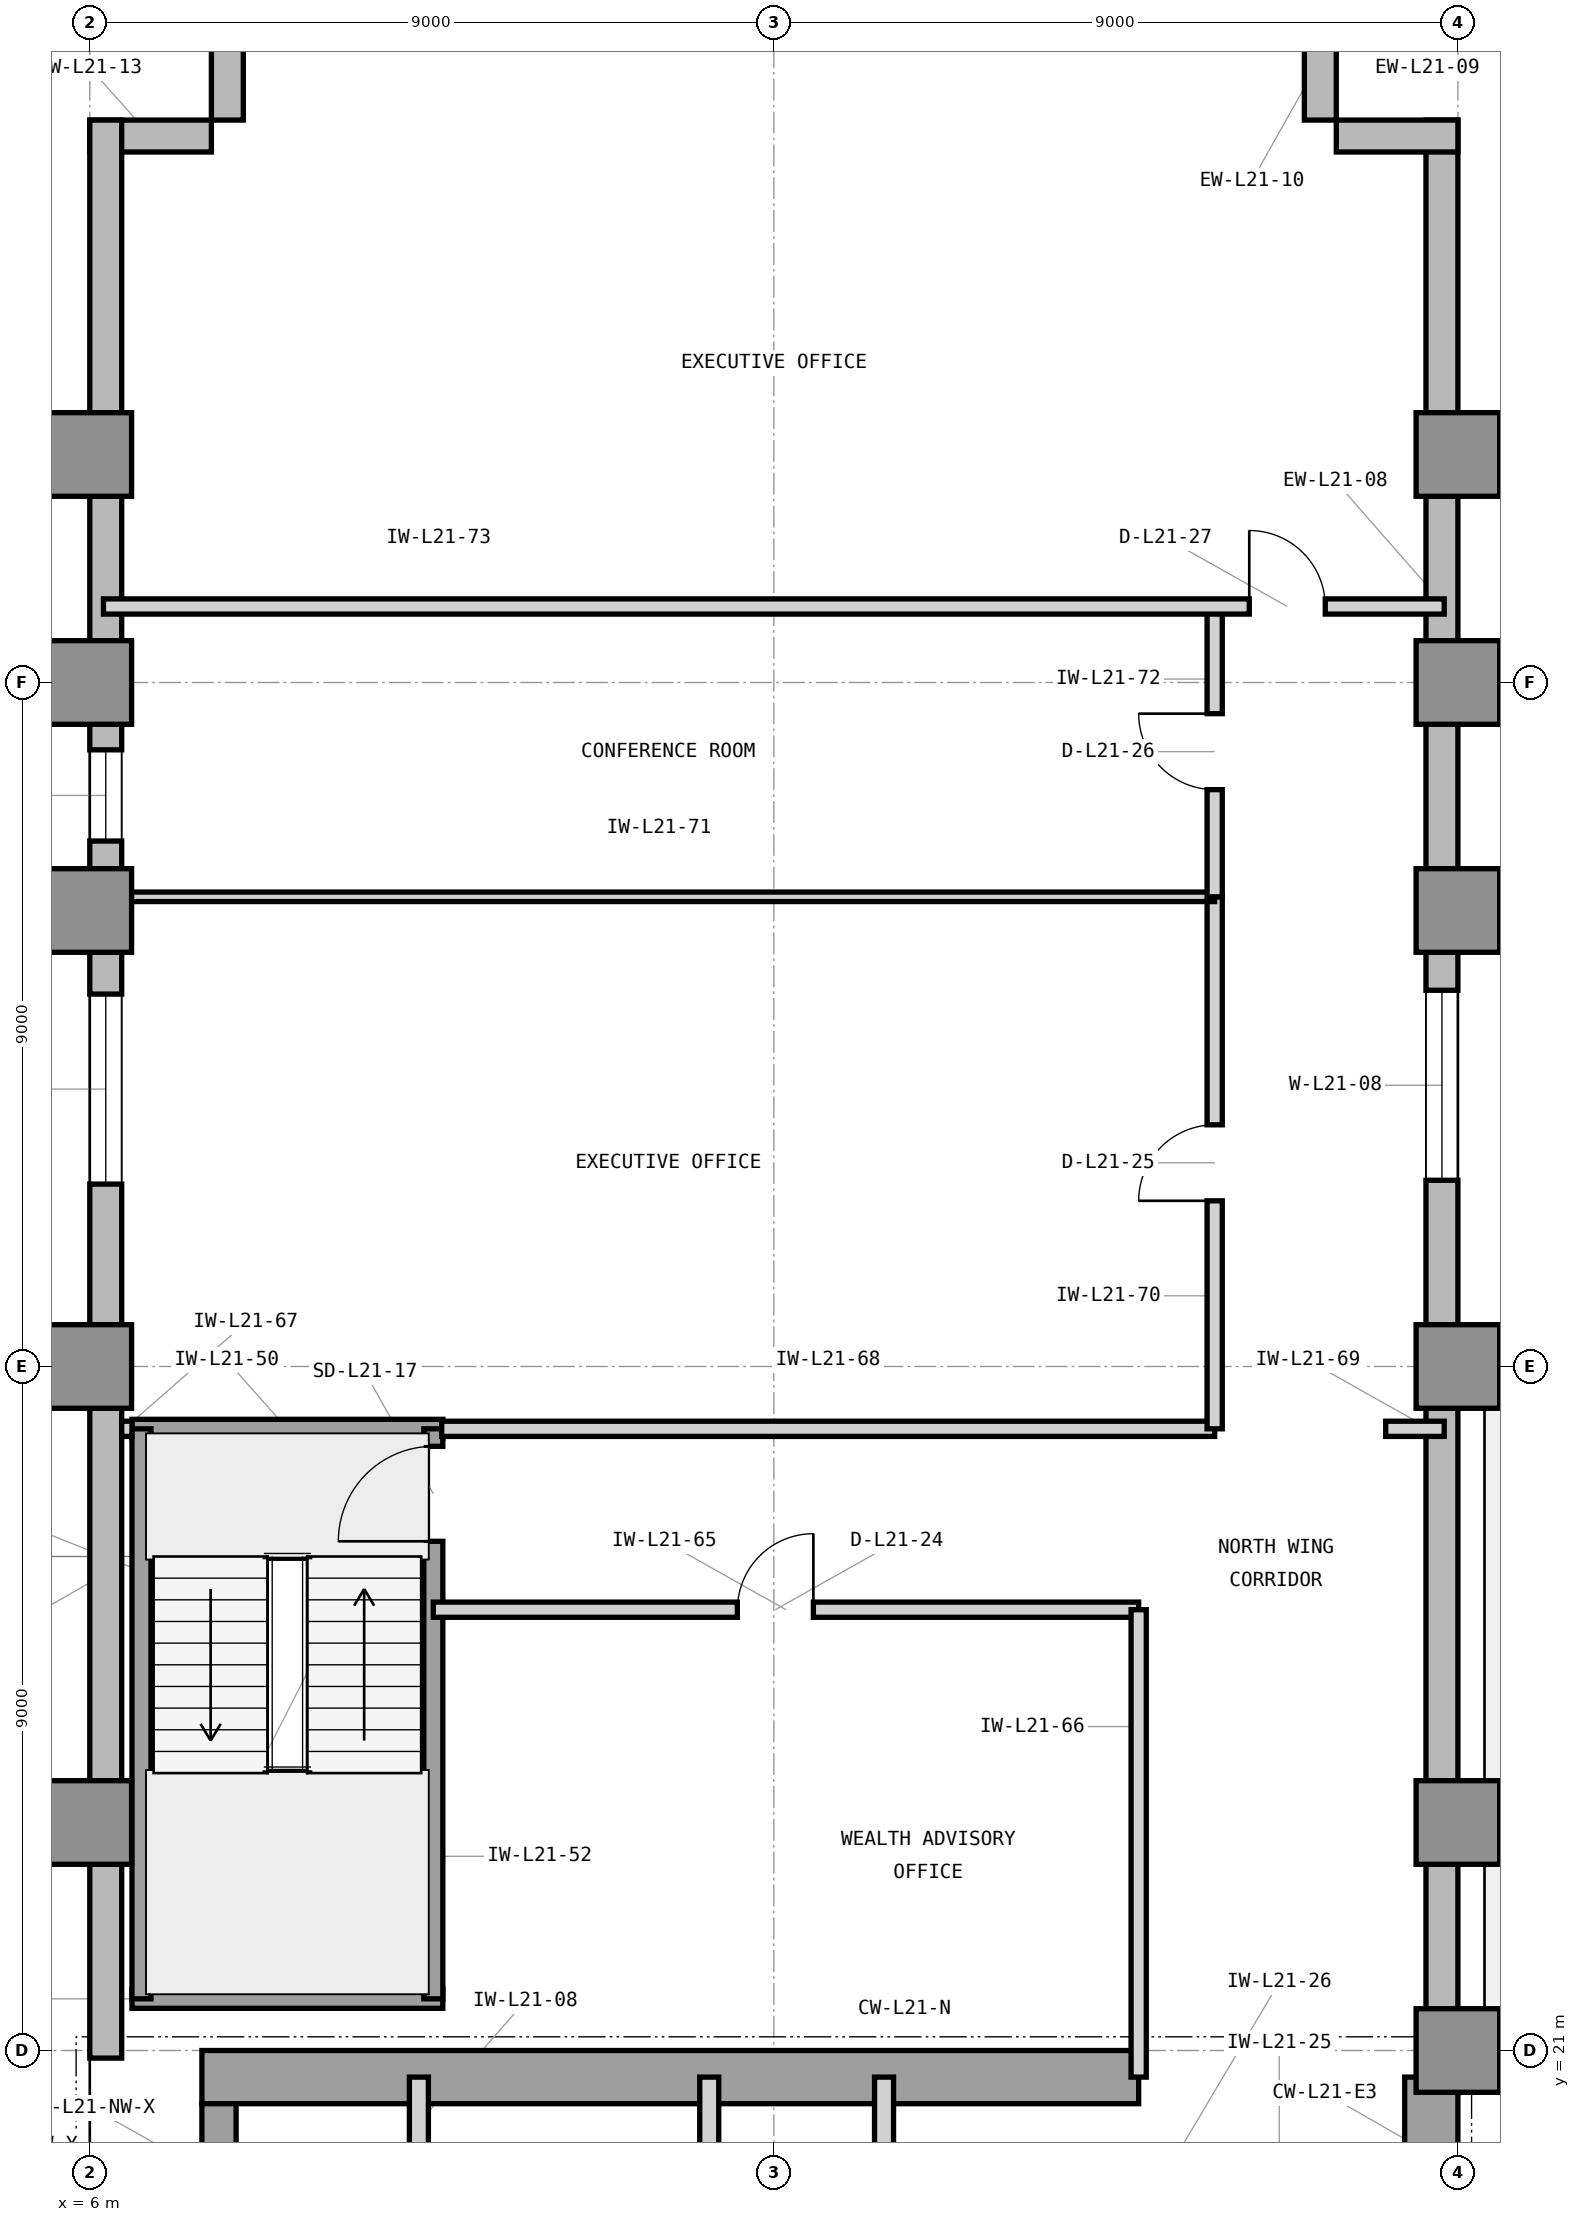
"""IFC4 building model, lengths in metres.
Left out: names, types, materials, properties, quantities, classifications, styles, units other than length and angle.
Written with IfcOpenShell. Run it as: python <this file> out.ifc"""

import sys

from ifc_helpers import new_model, si_unit, direction, frame, frame_2d, origin, origin_2d, place, context, subcontext, project, spatial, rectangle, extrude, element, fill, save


model = new_model("IFC4")
c1 = context("Model", 3, precision=1e-05, world=origin(), true_north=direction((0.0, 1.0)))
c2 = subcontext(c1, "Body", "Model", "MODEL_VIEW")
j1 = project(units=[si_unit("LENGTHUNIT", "METRE"), si_unit("PLANEANGLEUNIT", "RADIAN")], contexts=[c1])
p1 = place(None, origin())
s1 = spatial("IfcSite", under=j1, at=p1, CompositionType="ELEMENT")
p2 = place(p1, origin())
s2 = spatial("IfcBuilding", under=s1, at=p2, CompositionType="ELEMENT")
p3 = place(p2, frame((0.0, 0.0, 93.3)))
s3 = spatial("IfcBuildingStorey", under=s2, at=p3, CompositionType="ELEMENT", Elevation=93.3)
p4 = place(p3, frame((7.475, 20.65, 0.0), z_axis=(0.0, 0.0, 1.0), x_axis=(1.0, 0.0, 0.0)))
e1 = element("IfcWall", 1, at=p4, inside=s3, PredefinedType="SHEAR", context=c2, shape_type="SweptSolid", body=[
    extrude(rectangle(XDim=12.325, YDim=0.7, at=frame_2d((6.163, 0.0))), origin(), (0.0, 0.0, 1.0), 3.9),
])
p5 = place(p3, frame((23.65, 16.6, 0.0), z_axis=(0.0, 0.0, 1.0), x_axis=(0.0, 1.0, 0.0)))
e2 = element("IfcWall", 2, at=p5, inside=s3, PredefinedType="SHEAR", context=c2, shape_type="SweptSolid", body=[
    extrude(rectangle(XDim=4.05, YDim=0.7, at=frame_2d((2.025, 0.0))), origin(), (0.0, 0.0, 1.0), 3.9),
])
p6 = place(p3, frame((7.7, 19.575, 0.0), z_axis=(0.0, 0.0, 1.0), x_axis=(0.0, 1.0, 0.0)))
e3 = element("IfcWall", 3, at=p6, inside=s3, PredefinedType="SHEAR", context=c2, shape_type="SweptSolid", body=[
    extrude(rectangle(XDim=0.725, YDim=0.45, at=frame_2d((0.363, 0.0))), origin(), (0.0, 0.0, 1.0), 3.9),
])
for number, where, z_axis, x_axis in (
    (4, (24.0, 21.0, 0.0), (0.0, 0.0, 1.0), (1.0, 0.0, 0.0)),
    (5, (6.0, 24.0, 0.0), (0.0, 0.0, 1.0), (1.0, 0.0, 0.0)),
    (6, (24.0, 24.0, 0.0), (0.0, 0.0, 1.0), (1.0, 0.0, 0.0)),
    (7, (6.0, 30.0, 0.0), (0.0, 0.0, 1.0), (1.0, 0.0, 0.0)),
    (8, (24.0, 30.0, 0.0), (0.0, 0.0, 1.0), (1.0, 0.0, 0.0)),
    (9, (6.0, 36.0, 0.0), (0.0, 0.0, 1.0), (1.0, 0.0, 0.0)),
    (10, (24.0, 36.0, 0.0), (0.0, 0.0, 1.0), (1.0, 0.0, 0.0)),
    (11, (6.0, 39.0, 0.0), (0.0, 0.0, 1.0), (1.0, 0.0, 0.0)),
    (12, (24.0, 39.0, 0.0), (0.0, 0.0, 1.0), (1.0, 0.0, 0.0)),
    (13, (6.0, 42.0, 0.0), (0.0, 0.0, 1.0), (1.0, 0.0, 0.0)),
    (14, (24.0, 42.0, 0.0), (0.0, 0.0, 1.0), (1.0, 0.0, 0.0)),
):
    element("IfcColumn", number, at=place(p3, frame(where, z_axis=z_axis, x_axis=x_axis)), inside=s3, PredefinedType="COLUMN", context=c2, shape_type="SweptSolid", body=[
        extrude(rectangle(XDim=1.1, YDim=1.1, at=origin_2d()), origin(), (0.0, 0.0, 1.0), 3.9),
    ])
p7 = place(p3, frame((61.4, 20.79, 0.0), z_axis=(0.0, 0.0, 1.0), x_axis=(-1.0, 0.0, 0.0)))
e15 = element("IfcWall", 15, at=p7, inside=s3, PredefinedType="STANDARD", context=c2, shape_type="SweptSolid", body=[
    extrude(rectangle(XDim=37.4, YDim=0.42, at=frame_2d((18.7, 0.0))), origin(), (0.0, 0.0, 1.0), 3.7),
])
p8 = place(p7, frame((15.113, 0.0, 0.85)))
e16 = element("IfcOpeningElement", 16, at=p8, cuts=e15, PredefinedType="OPENING", context=c2, shape_type="SweptSolid", body=[
    extrude(rectangle(XDim=2.5, YDim=2.25, at=frame_2d((1.25, 1.125))), frame((0.0, 0.22, 0.0), z_axis=(0.0, -1.0, 0.0), x_axis=(1.0, 0.0, 0.0)), (0.0, 0.0, 1.0), 0.44),
])
p9 = place(p7, frame((24.462, 0.0, 0.85)))
e17 = element("IfcOpeningElement", 17, at=p9, cuts=e15, PredefinedType="OPENING", context=c2, shape_type="SweptSolid", body=[
    extrude(rectangle(XDim=2.5, YDim=2.25, at=frame_2d((1.25, 1.125))), frame((0.0, 0.22, 0.0), z_axis=(0.0, -1.0, 0.0), x_axis=(1.0, 0.0, 0.0)), (0.0, 0.0, 1.0), 0.44),
])
p10 = place(p7, frame((34.163, 0.0, 0.85)))
e18 = element("IfcOpeningElement", 18, at=p10, cuts=e15, PredefinedType="OPENING", context=c2, shape_type="SweptSolid", body=[
    extrude(rectangle(XDim=1.8, YDim=2.25, at=frame_2d((0.9, 1.125))), frame((0.0, 0.22, 0.0), z_axis=(0.0, -1.0, 0.0), x_axis=(1.0, 0.0, 0.0)), (0.0, 0.0, 1.0), 0.44),
])
p11 = place(p7, frame((8.286, 0.0, 0.85)))
e19 = element("IfcOpeningElement", 19, at=p11, cuts=e15, PredefinedType="OPENING", context=c2, shape_type="SweptSolid", body=[
    extrude(rectangle(XDim=1.2, YDim=2.25, at=frame_2d((0.6, 1.125))), frame((0.0, 0.22, 0.0), z_axis=(0.0, -1.0, 0.0), x_axis=(1.0, 0.0, 0.0)), (0.0, 0.0, 1.0), 0.44),
])
p12 = place(p3, frame((23.79, 21.0, 0.0), z_axis=(0.0, 0.0, 1.0), x_axis=(0.0, 1.0, 0.0)))
e20 = element("IfcWall", 20, at=p12, inside=s3, PredefinedType="STANDARD", context=c2, shape_type="SweptSolid", body=[
    extrude(rectangle(XDim=25.4, YDim=0.42, at=frame_2d((12.7, 0.0))), origin(), (0.0, 0.0, 1.0), 3.7),
])
p13 = place(p12, frame((11.45, 0.0, 0.85)))
e21 = element("IfcOpeningElement", 21, at=p13, cuts=e20, PredefinedType="OPENING", context=c2, shape_type="SweptSolid", body=[
    extrude(rectangle(XDim=2.5, YDim=2.25, at=frame_2d((1.25, 1.125))), frame((0.0, 0.22, 0.0), z_axis=(0.0, -1.0, 0.0), x_axis=(1.0, 0.0, 0.0)), (0.0, 0.0, 1.0), 0.44),
])
for number, where, z_axis, x_axis in (
    (22, (24.0, 46.19, 0.0), (0.0, 0.0, 1.0), (-1.0, 0.0, 0.0)),
    (23, (22.19, 46.4, 0.0), (0.0, 0.0, 1.0), (0.0, 1.0, 0.0)),
    (24, (7.81, 48.0, 0.0), (0.0, 0.0, 1.0), (0.0, -1.0, 0.0)),
    (25, (7.6, 46.19, 0.0), (0.0, 0.0, 1.0), (-1.0, 0.0, 0.0)),
):
    element("IfcWall", number, at=place(p3, frame(where, z_axis=z_axis, x_axis=x_axis)), inside=s3, PredefinedType="STANDARD", context=c2, shape_type="SweptSolid", body=[
        extrude(rectangle(XDim=1.6, YDim=0.42, at=frame_2d((0.8, 0.0))), origin(), (0.0, 0.0, 1.0), 3.7),
    ])
p14 = place(p3, frame((6.21, 46.4, 0.0), z_axis=(0.0, 0.0, 1.0), x_axis=(0.0, -1.0, 0.0)))
e26 = element("IfcWall", 26, at=p14, inside=s3, PredefinedType="STANDARD", context=c2, shape_type="SweptSolid", body=[
    extrude(rectangle(XDim=25.5, YDim=0.42, at=frame_2d((12.75, 0.0))), origin(), (0.0, 0.0, 1.0), 3.7),
])
p15 = place(p14, frame((11.5, 0.0, 0.85)))
e27 = element("IfcOpeningElement", 27, at=p15, cuts=e26, PredefinedType="OPENING", context=c2, shape_type="SweptSolid", body=[
    extrude(rectangle(XDim=2.5, YDim=2.25, at=frame_2d((1.25, 1.125))), frame((0.0, 0.22, 0.0), z_axis=(0.0, -1.0, 0.0), x_axis=(1.0, 0.0, 0.0)), (0.0, 0.0, 1.0), 0.44),
])
p16 = place(p14, frame((8.286, 0.0, 0.85)))
e28 = element("IfcOpeningElement", 28, at=p16, cuts=e26, PredefinedType="OPENING", context=c2, shape_type="SweptSolid", body=[
    extrude(rectangle(XDim=1.2, YDim=2.25, at=frame_2d((0.6, 1.125))), frame((0.0, 0.22, 0.0), z_axis=(0.0, -1.0, 0.0), x_axis=(1.0, 0.0, 0.0)), (0.0, 0.0, 1.0), 0.44),
])
p17 = place(p3, frame((10.33, 19.45, 0.0), z_axis=(0.0, 0.0, 1.0), x_axis=(0.0, 1.0, 0.0)))
e29 = element("IfcWall", 29, at=p17, inside=s3, PredefinedType="PARTITIONING", context=c2, shape_type="SweptSolid", body=[
    extrude(rectangle(XDim=1.2, YDim=0.25, at=frame_2d((0.6, 0.0))), origin(), (0.0, 0.0, 1.0), 2.917),
])
for number, where, z_axis, x_axis in (
    (30, (14.15, 16.7, 0.0), (0.0, 0.0, 1.0), (0.0, 1.0, 0.0)),
    (31, (16.45, 16.7, 0.0), (0.0, 0.0, 1.0), (0.0, 1.0, 0.0)),
):
    element("IfcWall", number, at=place(p3, frame(where, z_axis=z_axis, x_axis=x_axis)), inside=s3, PredefinedType="PARTITIONING", context=c2, shape_type="SweptSolid", body=[
        extrude(rectangle(XDim=3.95, YDim=0.25, at=frame_2d((1.975, 0.0))), origin(), (0.0, 0.0, 1.0), 3.69),
    ])
for number, where, z_axis, x_axis in (
    (32, (6.555, 21.68, 0.0), (0.0, 0.0, 1.0), (1.0, 0.0, 0.0)),
    (33, (6.555, 29.18, 0.0), (0.0, 0.0, 1.0), (1.0, 0.0, 0.0)),
):
    element("IfcWall", number, at=place(p3, frame(where, z_axis=z_axis, x_axis=x_axis)), inside=s3, PredefinedType="SHEAR", context=c2, shape_type="SweptSolid", body=[
        extrude(rectangle(XDim=4.09, YDim=0.25, at=frame_2d((2.045, 0.0))), origin(), (0.0, 0.0, 1.0), 3.9),
    ])
p18 = place(p3, frame((6.68, 21.68, 0.0), z_axis=(0.0, 0.0, 1.0), x_axis=(0.0, 1.0, 0.0)))
e34 = element("IfcWall", 34, at=p18, inside=s3, PredefinedType="SHEAR", context=c2, shape_type="SweptSolid", body=[
    extrude(rectangle(XDim=7.5, YDim=0.25, at=frame_2d((3.75, 0.0))), origin(), (0.0, 0.0, 1.0), 3.9),
])
p19 = place(p3, frame((10.52, 21.68, 0.0), z_axis=(0.0, 0.0, 1.0), x_axis=(0.0, 1.0, 0.0)))
e35 = element("IfcWall", 35, at=p19, inside=s3, PredefinedType="SHEAR", context=c2, shape_type="SweptSolid", body=[
    extrude(rectangle(XDim=7.5, YDim=0.25, at=frame_2d((3.75, 0.0))), origin(), (0.0, 0.0, 1.0), 3.9),
])
p20 = place(p19, frame((6.02, 0.0, 0.0)))
e36 = element("IfcOpeningElement", 36, at=p20, cuts=e35, PredefinedType="OPENING", context=c2, shape_type="SweptSolid", body=[
    extrude(rectangle(XDim=1.25, YDim=2.2, at=frame_2d((0.625, 1.1))), frame((0.0, 0.135, 0.0), z_axis=(0.0, -1.0, 0.0), x_axis=(1.0, 0.0, 0.0)), (0.0, 0.0, 1.0), 0.27),
])
p21 = place(p3, frame((10.52, 26.8, 0.0), z_axis=(0.0, 0.0, 1.0), x_axis=(1.0, 0.0, 0.0)))
e37 = element("IfcWall", 37, at=p21, inside=s3, PredefinedType="PARTITIONING", context=c2, shape_type="SweptSolid", body=[
    extrude(rectangle(XDim=9.28, YDim=0.2, at=frame_2d((4.64, 0.0))), origin(), (0.0, 0.0, 1.0), 3.69),
])
p22 = place(p21, frame((4.0, 0.0, 0.0)))
e38 = element("IfcOpeningElement", 38, at=p22, cuts=e37, PredefinedType="OPENING", context=c2, shape_type="SweptSolid", body=[
    extrude(rectangle(XDim=1.0, YDim=2.15, at=frame_2d((0.5, 1.075))), frame((0.0, 0.11, 0.0), z_axis=(0.0, -1.0, 0.0), x_axis=(1.0, 0.0, 0.0)), (0.0, 0.0, 1.0), 0.22),
])
p23 = place(p3, frame((19.8, 20.65, 0.0), z_axis=(0.0, 0.0, 1.0), x_axis=(0.0, 1.0, 0.0)))
e39 = element("IfcWall", 39, at=p23, inside=s3, PredefinedType="PARTITIONING", context=c2, shape_type="SweptSolid", body=[
    extrude(rectangle(XDim=6.15, YDim=0.2, at=frame_2d((3.075, 0.0))), origin(), (0.0, 0.0, 1.0), 3.69),
])
p24 = place(p3, frame((6.42, 29.18, 0.0), z_axis=(0.0, 0.0, 1.0), x_axis=(1.0, 0.0, 0.0)))
e40 = element("IfcWall", 40, at=p24, inside=s3, PredefinedType="PARTITIONING", context=c2, shape_type="SweptSolid", body=[
    extrude(rectangle(XDim=0.135, YDim=0.2, at=frame_2d((0.067, 0.0))), origin(), (0.0, 0.0, 1.0), 3.69),
])
p25 = place(p3, frame((10.63, 29.18, 0.0), z_axis=(0.0, 0.0, 1.0), x_axis=(1.0, 0.0, 0.0)))
e41 = element("IfcWall", 41, at=p25, inside=s3, PredefinedType="PARTITIONING", context=c2, shape_type="SweptSolid", body=[
    extrude(rectangle(XDim=10.17, YDim=0.2, at=frame_2d((5.085, 0.0))), origin(), (0.0, 0.0, 1.0), 3.69),
])
p26 = place(p3, frame((23.05, 29.18, 0.0), z_axis=(0.0, 0.0, 1.0), x_axis=(1.0, 0.0, 0.0)))
e42 = element("IfcWall", 42, at=p26, inside=s3, PredefinedType="PARTITIONING", context=c2, shape_type="SweptSolid", body=[
    extrude(rectangle(XDim=0.77, YDim=0.2, at=frame_2d((0.385, 0.0))), origin(), (0.0, 0.0, 1.0), 3.69),
])
p27 = place(p3, frame((20.8, 29.18, 0.0), z_axis=(0.0, 0.0, 1.0), x_axis=(0.0, 1.0, 0.0)))
e43 = element("IfcWall", 43, at=p27, inside=s3, PredefinedType="PARTITIONING", context=c2, shape_type="SweptSolid", body=[
    extrude(rectangle(XDim=7.0, YDim=0.2, at=frame_2d((3.5, 0.0))), origin(), (0.0, 0.0, 1.0), 3.69),
])
p28 = place(p27, frame((3.0, 0.0, 0.0)))
e44 = element("IfcOpeningElement", 44, at=p28, cuts=e43, PredefinedType="OPENING", context=c2, shape_type="SweptSolid", body=[
    extrude(rectangle(XDim=1.0, YDim=2.15, at=frame_2d((0.5, 1.075))), frame((0.0, 0.11, 0.0), z_axis=(0.0, -1.0, 0.0), x_axis=(1.0, 0.0, 0.0)), (0.0, 0.0, 1.0), 0.22),
])
p29 = place(p3, frame((6.18, 36.18, 0.0), z_axis=(0.0, 0.0, 1.0), x_axis=(1.0, 0.0, 0.0)))
e45 = element("IfcWall", 45, at=p29, inside=s3, PredefinedType="PARTITIONING", context=c2, shape_type="SweptSolid", body=[
    extrude(rectangle(XDim=14.62, YDim=0.125, at=frame_2d((7.31, 0.0))), origin(), (0.0, 0.0, 1.0), 2.917),
])
p30 = place(p3, frame((20.8, 36.18, 0.0), z_axis=(0.0, 0.0, 1.0), x_axis=(0.0, 1.0, 0.0)))
e46 = element("IfcWall", 46, at=p30, inside=s3, PredefinedType="PARTITIONING", context=c2, shape_type="SweptSolid", body=[
    extrude(rectangle(XDim=3.82, YDim=0.2, at=frame_2d((1.91, 0.0))), origin(), (0.0, 0.0, 1.0), 3.69),
])
p31 = place(p30, frame((1.41, 0.0, 0.0)))
e47 = element("IfcOpeningElement", 47, at=p31, cuts=e46, PredefinedType="OPENING", context=c2, shape_type="SweptSolid", body=[
    extrude(rectangle(XDim=1.0, YDim=2.15, at=frame_2d((0.5, 1.075))), frame((0.0, 0.11, 0.0), z_axis=(0.0, -1.0, 0.0), x_axis=(1.0, 0.0, 0.0)), (0.0, 0.0, 1.0), 0.22),
])
p32 = place(p3, frame((6.18, 40.0, 0.0), z_axis=(0.0, 0.0, 1.0), x_axis=(1.0, 0.0, 0.0)))
e48 = element("IfcWall", 48, at=p32, inside=s3, PredefinedType="PARTITIONING", context=c2, shape_type="SweptSolid", body=[
    extrude(rectangle(XDim=17.64, YDim=0.2, at=frame_2d((8.82, 0.0))), origin(), (0.0, 0.0, 1.0), 3.69),
])
p33 = place(p32, frame((15.075, 0.0, 0.0)))
e49 = element("IfcOpeningElement", 49, at=p33, cuts=e48, PredefinedType="OPENING", context=c2, shape_type="SweptSolid", body=[
    extrude(rectangle(XDim=1.0, YDim=2.15, at=frame_2d((0.5, 1.075))), frame((0.0, 0.11, 0.0), z_axis=(0.0, -1.0, 0.0), x_axis=(1.0, 0.0, 0.0)), (0.0, 0.0, 1.0), 0.22),
])
p34 = place(p13, origin())
e50 = element("IfcWindow", 50, at=p34, inside=s3, PartitioningType="SINGLE_PANEL", PredefinedType="WINDOW", context=c2, shape_type="SweptSolid", body=[
    extrude(rectangle(XDim=2.5, YDim=2.25, at=frame_2d((1.25, 1.125))), frame((0.0, 0.11, 0.0), z_axis=(0.0, -1.0, 0.0), x_axis=(1.0, 0.0, 0.0)), (0.0, 0.0, 1.0), 0.06),
])
fill(e21, e50)
p35 = place(p15, origin())
e51 = element("IfcWindow", 51, at=p35, inside=s3, PartitioningType="SINGLE_PANEL", PredefinedType="WINDOW", context=c2, shape_type="SweptSolid", body=[
    extrude(rectangle(XDim=2.5, YDim=2.25, at=frame_2d((1.25, 1.125))), frame((0.0, 0.11, 0.0), z_axis=(0.0, -1.0, 0.0), x_axis=(1.0, 0.0, 0.0)), (0.0, 0.0, 1.0), 0.06),
])
fill(e27, e51)
p36 = place(p20, origin())
e52 = element("IfcDoor", 52, at=p36, inside=s3, OperationType="SINGLE_SWING_LEFT", PredefinedType="DOOR", context=c2, shape_type="SweptSolid", body=[
    extrude(rectangle(XDim=1.25, YDim=2.2, at=frame_2d((0.625, 1.1))), frame((0.0, 0.025, 0.0), z_axis=(0.0, -1.0, 0.0), x_axis=(1.0, 0.0, 0.0)), (0.0, 0.0, 1.0), 0.05),
])
fill(e36, e52)
p37 = place(p22, origin())
e53 = element("IfcDoor", 53, at=p37, inside=s3, OperationType="SINGLE_SWING_RIGHT", PredefinedType="DOOR", context=c2, shape_type="SweptSolid", body=[
    extrude(rectangle(XDim=1.0, YDim=2.15, at=frame_2d((0.5, 1.075))), frame((0.0, 0.025, 0.0), z_axis=(0.0, -1.0, 0.0), x_axis=(1.0, 0.0, 0.0)), (0.0, 0.0, 1.0), 0.05),
])
fill(e38, e53)
p38 = place(p28, origin())
e54 = element("IfcDoor", 54, at=p38, inside=s3, OperationType="SINGLE_SWING_LEFT", PredefinedType="DOOR", context=c2, shape_type="SweptSolid", body=[
    extrude(rectangle(XDim=1.0, YDim=2.15, at=frame_2d((0.5, 1.075))), frame((0.0, 0.025, 0.0), z_axis=(0.0, -1.0, 0.0), x_axis=(1.0, 0.0, 0.0)), (0.0, 0.0, 1.0), 0.05),
])
fill(e44, e54)
p39 = place(p31, origin())
e55 = element("IfcDoor", 55, at=p39, inside=s3, OperationType="SINGLE_SWING_RIGHT", PredefinedType="DOOR", context=c2, shape_type="SweptSolid", body=[
    extrude(rectangle(XDim=1.0, YDim=2.15, at=frame_2d((0.5, 1.075))), frame((0.0, 0.025, 0.0), z_axis=(0.0, -1.0, 0.0), x_axis=(1.0, 0.0, 0.0)), (0.0, 0.0, 1.0), 0.05),
])
fill(e47, e55)
p40 = place(p33, origin())
e56 = element("IfcDoor", 56, at=p40, inside=s3, OperationType="SINGLE_SWING_LEFT", PredefinedType="DOOR", context=c2, shape_type="SweptSolid", body=[
    extrude(rectangle(XDim=1.0, YDim=2.15, at=frame_2d((0.5, 1.075))), frame((0.0, 0.025, 0.0), z_axis=(0.0, -1.0, 0.0), x_axis=(1.0, 0.0, 0.0)), (0.0, 0.0, 1.0), 0.05),
])
fill(e49, e56)
p41 = place(p16, origin())
e57 = element("IfcWindow", 57, at=p41, inside=s3, PartitioningType="SINGLE_PANEL", PredefinedType="WINDOW", context=c2, shape_type="SweptSolid", body=[
    extrude(rectangle(XDim=1.2, YDim=2.25, at=frame_2d((0.6, 1.125))), frame((0.0, 0.11, 0.0), z_axis=(0.0, -1.0, 0.0), x_axis=(1.0, 0.0, 0.0)), (0.0, 0.0, 1.0), 0.06),
])
fill(e28, e57)
save(model, sys.argv[1])
